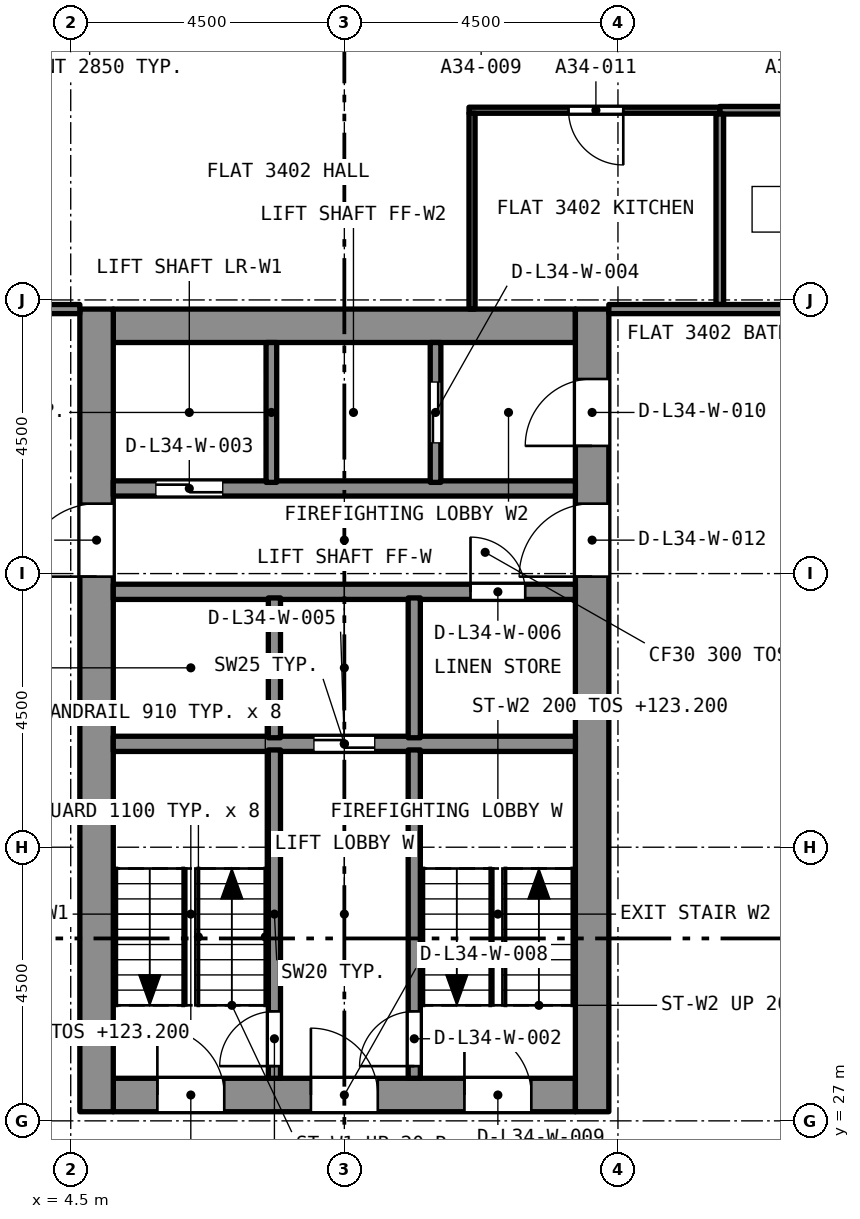
"""IFC4 building model, lengths in metres.
Left out: names, types, materials, properties, quantities, classifications, styles, units other than length and angle.
Written with IfcOpenShell. Run it as: python <this file> out.ifc"""

import sys

from ifc_helpers import new_model, si_unit, direction, frame, frame_2d, origin, place, context, subcontext, project, spatial, rectangle, extrude, element, fill, save


model = new_model("IFC4")
c1 = context("Model", 3, precision=1e-05, world=origin(), true_north=direction((0.0, 1.0)))
c2 = subcontext(c1, "Body", "Model", "MODEL_VIEW")
j1 = project(units=[si_unit("LENGTHUNIT", "METRE"), si_unit("PLANEANGLEUNIT", "RADIAN")], contexts=[c1])
p1 = place(None, origin())
s1 = spatial("IfcSite", under=j1, at=p1, CompositionType="ELEMENT")
p2 = place(p1, origin())
s2 = spatial("IfcBuilding", under=s1, at=p2, CompositionType="ELEMENT")
p3 = place(p2, frame((0.0, 0.0, 121.6)))
s3 = spatial("IfcBuildingStorey", under=s2, at=p3, CompositionType="ELEMENT", Elevation=121.6)
p4 = place(p3, frame((5.2, 27.425, 0.0), z_axis=(0.0, 0.0, 1.0), x_axis=(1.0, 0.0, 0.0)))
e1 = element("IfcWall", 1, at=p4, inside=s3, PredefinedType="SOLIDWALL", context=c2, shape_type="SweptSolid", body=[
    extrude(rectangle(XDim=7.6, YDim=0.55, at=frame_2d((3.8, 0.0))), origin(), (0.0, 0.0, 1.0), 3.2),
])
p5 = place(p4, frame((0.725, 0.0, 0.0)))
e2 = element("IfcOpeningElement", 2, at=p5, cuts=e1, PredefinedType="OPENING", context=c2, shape_type="SweptSolid", body=[
    extrude(rectangle(XDim=1.1, YDim=2.1, at=frame_2d((0.55, 1.05))), frame((0.0, 0.285, 0.0), z_axis=(0.0, -1.0, 0.0), x_axis=(1.0, 0.0, 0.0)), (0.0, 0.0, 1.0), 0.57),
])
p6 = place(p4, frame((3.25, 0.0, 0.0)))
e3 = element("IfcOpeningElement", 3, at=p6, cuts=e1, PredefinedType="OPENING", context=c2, shape_type="SweptSolid", body=[
    extrude(rectangle(XDim=1.1, YDim=2.1, at=frame_2d((0.55, 1.05))), frame((0.0, 0.285, 0.0), z_axis=(0.0, -1.0, 0.0), x_axis=(1.0, 0.0, 0.0)), (0.0, 0.0, 1.0), 0.57),
])
p7 = place(p4, frame((5.775, 0.0, 0.0)))
e4 = element("IfcOpeningElement", 4, at=p7, cuts=e1, PredefinedType="OPENING", context=c2, shape_type="SweptSolid", body=[
    extrude(rectangle(XDim=1.1, YDim=2.1, at=frame_2d((0.55, 1.05))), frame((0.0, 0.285, 0.0), z_axis=(0.0, -1.0, 0.0), x_axis=(1.0, 0.0, 0.0)), (0.0, 0.0, 1.0), 0.57),
])
p8 = place(p3, frame((5.2, 40.075, 0.0), z_axis=(0.0, 0.0, 1.0), x_axis=(1.0, 0.0, 0.0)))
e5 = element("IfcWall", 5, at=p8, inside=s3, PredefinedType="SOLIDWALL", context=c2, shape_type="SweptSolid", body=[
    extrude(rectangle(XDim=7.6, YDim=0.55, at=frame_2d((3.8, 0.0))), origin(), (0.0, 0.0, 1.0), 3.2),
])
p9 = place(p3, frame((4.925, 27.15, 0.0), z_axis=(0.0, 0.0, 1.0), x_axis=(0.0, 1.0, 0.0)))
e6 = element("IfcWall", 6, at=p9, inside=s3, PredefinedType="SOLIDWALL", context=c2, shape_type="SweptSolid", body=[
    extrude(rectangle(XDim=13.2, YDim=0.55, at=frame_2d((6.6, 0.0))), origin(), (0.0, 0.0, 1.0), 3.2),
])
p10 = place(p9, frame((8.8, 0.0, 0.0)))
e7 = element("IfcOpeningElement", 7, at=p10, cuts=e6, PredefinedType="OPENING", context=c2, shape_type="SweptSolid", body=[
    extrude(rectangle(XDim=1.2, YDim=2.1, at=frame_2d((0.6, 1.05))), frame((0.0, 0.285, 0.0), z_axis=(0.0, -1.0, 0.0), x_axis=(1.0, 0.0, 0.0)), (0.0, 0.0, 1.0), 0.57),
])
p11 = place(p3, frame((13.075, 27.15, 0.0), z_axis=(0.0, 0.0, 1.0), x_axis=(0.0, 1.0, 0.0)))
e8 = element("IfcWall", 8, at=p11, inside=s3, PredefinedType="SOLIDWALL", context=c2, shape_type="SweptSolid", body=[
    extrude(rectangle(XDim=13.2, YDim=0.55, at=frame_2d((6.6, 0.0))), origin(), (0.0, 0.0, 1.0), 3.2),
])
p12 = place(p11, frame((10.95, 0.0, 0.0)))
e9 = element("IfcOpeningElement", 9, at=p12, cuts=e8, PredefinedType="OPENING", context=c2, shape_type="SweptSolid", body=[
    extrude(rectangle(XDim=1.1, YDim=2.1, at=frame_2d((0.55, 1.05))), frame((0.0, 0.285, 0.0), z_axis=(0.0, -1.0, 0.0), x_axis=(1.0, 0.0, 0.0)), (0.0, 0.0, 1.0), 0.57),
])
p13 = place(p11, frame((8.8, 0.0, 0.0)))
e10 = element("IfcOpeningElement", 10, at=p13, cuts=e8, PredefinedType="OPENING", context=c2, shape_type="SweptSolid", body=[
    extrude(rectangle(XDim=1.2, YDim=2.1, at=frame_2d((0.6, 1.05))), frame((0.0, 0.285, 0.0), z_axis=(0.0, -1.0, 0.0), x_axis=(1.0, 0.0, 0.0)), (0.0, 0.0, 1.0), 0.57),
])
p14 = place(p3, frame((17.875, 43.62, 0.0), z_axis=(0.0, 0.0, 1.0), x_axis=(-1.0, 0.0, 0.0)))
e11 = element("IfcWall", 11, at=p14, inside=s3, PredefinedType="PARTITIONING", context=c2, shape_type="SweptSolid", body=[
    extrude(rectangle(XDim=2.7, YDim=0.125, at=frame_2d((1.35, 0.0))), origin(), (0.0, 0.0, 1.0), 2.85),
])
p15 = place(p14, frame((0.888, 0.0, 0.0)))
e12 = element("IfcOpeningElement", 12, at=p15, cuts=e11, PredefinedType="OPENING", context=c2, shape_type="SweptSolid", body=[
    extrude(rectangle(XDim=0.8, YDim=2.1, at=frame_2d((0.4, 1.05))), frame((0.0, 0.073, 0.0), z_axis=(0.0, -1.0, 0.0), x_axis=(1.0, 0.0, 0.0)), (0.0, 0.0, 1.0), 0.145),
])
p16 = place(p3, frame((15.175, 40.425, 0.0), z_axis=(0.0, 0.0, 1.0), x_axis=(0.0, 1.0, 0.0)))
e13 = element("IfcWall", 13, at=p16, inside=s3, PredefinedType="PARTITIONING", context=c2, shape_type="SweptSolid", body=[
    extrude(rectangle(XDim=3.133, YDim=0.125, at=frame_2d((1.566, 0.0))), origin(), (0.0, 0.0, 1.0), 2.85),
])
p17 = place(p3, frame((15.175, 43.62, 0.0), z_axis=(0.0, 0.0, 1.0), x_axis=(-1.0, 0.0, 0.0)))
e14 = element("IfcWall", 14, at=p17, inside=s3, PredefinedType="PARTITIONING", context=c2, shape_type="SweptSolid", body=[
    extrude(rectangle(XDim=4.125, YDim=0.1, at=frame_2d((2.062, 0.0))), origin(), (0.0, 0.0, 1.0), 2.85),
])
p18 = place(p17, frame((1.587, 0.0, 0.0)))
e15 = element("IfcOpeningElement", 15, at=p18, cuts=e14, PredefinedType="OPENING", context=c2, shape_type="SweptSolid", body=[
    extrude(rectangle(XDim=0.9, YDim=2.1, at=frame_2d((0.45, 1.05))), frame((0.0, 0.06, 0.0), z_axis=(0.0, -1.0, 0.0), x_axis=(1.0, 0.0, 0.0)), (0.0, 0.0, 1.0), 0.12),
])
p19 = place(p3, frame((11.1, 40.35, 0.0), z_axis=(0.0, 0.0, 1.0), x_axis=(0.0, 1.0, 0.0)))
e16 = element("IfcWall", 16, at=p19, inside=s3, PredefinedType="PARTITIONING", context=c2, shape_type="SweptSolid", body=[
    extrude(rectangle(XDim=3.22, YDim=0.1, at=frame_2d((1.61, 0.0))), origin(), (0.0, 0.0, 1.0), 2.85),
])
p20 = place(p3, frame((0.575, 40.35, 0.0), z_axis=(0.0, 0.0, 1.0), x_axis=(1.0, 0.0, 0.0)))
e17 = element("IfcWall", 17, at=p20, inside=s3, PredefinedType="PARTITIONING", context=c2, shape_type="SweptSolid", body=[
    extrude(rectangle(XDim=4.075, YDim=0.15, at=frame_2d((2.038, 0.0))), origin(), (0.0, 0.0, 1.0), 2.85),
])
p21 = place(p20, frame((1.175, 0.0, 0.0)))
e18 = element("IfcOpeningElement", 18, at=p21, cuts=e17, PredefinedType="OPENING", context=c2, shape_type="SweptSolid", body=[
    extrude(rectangle(XDim=1.0, YDim=2.1, at=frame_2d((0.5, 1.05))), frame((0.0, 0.085, 0.0), z_axis=(0.0, -1.0, 0.0), x_axis=(1.0, 0.0, 0.0)), (0.0, 0.0, 1.0), 0.17),
])
p22 = place(p3, frame((13.35, 40.35, 0.0), z_axis=(0.0, 0.0, 1.0), x_axis=(1.0, 0.0, 0.0)))
e19 = element("IfcWall", 19, at=p22, inside=s3, PredefinedType="PARTITIONING", context=c2, shape_type="SweptSolid", body=[
    extrude(rectangle(XDim=4.075, YDim=0.15, at=frame_2d((2.038, 0.0))), origin(), (0.0, 0.0, 1.0), 2.85),
])
p23 = place(p3, frame((5.2, 33.2, 0.0), z_axis=(0.0, 0.0, 1.0), x_axis=(1.0, 0.0, 0.0)))
e20 = element("IfcWall", 20, at=p23, inside=s3, PredefinedType="SOLIDWALL", context=c2, shape_type="SweptSolid", body=[
    extrude(rectangle(XDim=7.6, YDim=0.25, at=frame_2d((3.8, 0.0))), origin(), (0.0, 0.0, 1.0), 2.85),
])
p24 = place(p23, frame((3.3, 0.0, 0.0)))
e21 = element("IfcOpeningElement", 21, at=p24, cuts=e20, PredefinedType="OPENING", context=c2, shape_type="SweptSolid", body=[
    extrude(rectangle(XDim=1.0, YDim=2.1, at=frame_2d((0.5, 1.05))), frame((0.0, 0.135, 0.0), z_axis=(0.0, -1.0, 0.0), x_axis=(1.0, 0.0, 0.0)), (0.0, 0.0, 1.0), 0.27),
])
p25 = place(p3, frame((5.2, 35.7, 0.0), z_axis=(0.0, 0.0, 1.0), x_axis=(1.0, 0.0, 0.0)))
e22 = element("IfcWall", 22, at=p25, inside=s3, PredefinedType="SOLIDWALL", context=c2, shape_type="SweptSolid", body=[
    extrude(rectangle(XDim=7.6, YDim=0.25, at=frame_2d((3.8, 0.0))), origin(), (0.0, 0.0, 1.0), 2.85),
])
p26 = place(p25, frame((5.875, 0.0, 0.0)))
e23 = element("IfcOpeningElement", 23, at=p26, cuts=e22, PredefinedType="OPENING", context=c2, shape_type="SweptSolid", body=[
    extrude(rectangle(XDim=0.9, YDim=2.1, at=frame_2d((0.45, 1.05))), frame((0.0, 0.135, 0.0), z_axis=(0.0, -1.0, 0.0), x_axis=(1.0, 0.0, 0.0)), (0.0, 0.0, 1.0), 0.27),
])
p27 = place(p3, frame((5.2, 37.4, 0.0), z_axis=(0.0, 0.0, 1.0), x_axis=(1.0, 0.0, 0.0)))
e24 = element("IfcWall", 24, at=p27, inside=s3, PredefinedType="SOLIDWALL", context=c2, shape_type="SweptSolid", body=[
    extrude(rectangle(XDim=7.6, YDim=0.25, at=frame_2d((3.8, 0.0))), origin(), (0.0, 0.0, 1.0), 2.85),
])
p28 = place(p27, frame((0.7, 0.0, 0.0)))
e25 = element("IfcOpeningElement", 25, at=p28, cuts=e24, PredefinedType="OPENING", context=c2, shape_type="SweptSolid", body=[
    extrude(rectangle(XDim=1.1, YDim=2.4, at=frame_2d((0.55, 1.2))), frame((0.0, 0.135, 0.0), z_axis=(0.0, -1.0, 0.0), x_axis=(1.0, 0.0, 0.0)), (0.0, 0.0, 1.0), 0.27),
])
p29 = place(p3, frame((7.85, 27.7, 0.0), z_axis=(0.0, 0.0, 1.0), x_axis=(0.0, 1.0, 0.0)))
e26 = element("IfcWall", 26, at=p29, inside=s3, PredefinedType="SOLIDWALL", context=c2, shape_type="SweptSolid", body=[
    extrude(rectangle(XDim=5.4, YDim=0.2, at=frame_2d((2.7, 0.0))), origin(), (0.0, 0.0, 1.0), 2.85),
])
p30 = place(p29, frame((0.2, 0.0, 0.0)))
e27 = element("IfcOpeningElement", 27, at=p30, cuts=e26, PredefinedType="OPENING", context=c2, shape_type="SweptSolid", body=[
    extrude(rectangle(XDim=0.9, YDim=2.1, at=frame_2d((0.45, 1.05))), frame((0.0, 0.11, 0.0), z_axis=(0.0, -1.0, 0.0), x_axis=(1.0, 0.0, 0.0)), (0.0, 0.0, 1.0), 0.22),
])
p31 = place(p3, frame((10.15, 27.7, 0.0), z_axis=(0.0, 0.0, 1.0), x_axis=(0.0, 1.0, 0.0)))
e28 = element("IfcWall", 28, at=p31, inside=s3, PredefinedType="SOLIDWALL", context=c2, shape_type="SweptSolid", body=[
    extrude(rectangle(XDim=5.4, YDim=0.2, at=frame_2d((2.7, 0.0))), origin(), (0.0, 0.0, 1.0), 2.85),
])
p32 = place(p31, frame((0.2, 0.0, 0.0)))
e29 = element("IfcOpeningElement", 29, at=p32, cuts=e28, PredefinedType="OPENING", context=c2, shape_type="SweptSolid", body=[
    extrude(rectangle(XDim=0.9, YDim=2.1, at=frame_2d((0.45, 1.05))), frame((0.0, 0.11, 0.0), z_axis=(0.0, -1.0, 0.0), x_axis=(1.0, 0.0, 0.0)), (0.0, 0.0, 1.0), 0.22),
])
for number, where, z_axis, x_axis in (
    (30, (7.85, 33.3, 0.0), (0.0, 0.0, 1.0), (0.0, 1.0, 0.0)),
    (31, (10.15, 33.3, 0.0), (0.0, 0.0, 1.0), (0.0, 1.0, 0.0)),
):
    element("IfcWall", number, at=place(p3, frame(where, z_axis=z_axis, x_axis=x_axis)), inside=s3, PredefinedType="SOLIDWALL", context=c2, shape_type="SweptSolid", body=[
        extrude(rectangle(XDim=2.3, YDim=0.2, at=frame_2d((1.15, 0.0))), origin(), (0.0, 0.0, 1.0), 2.85),
    ])
p33 = place(p3, frame((7.8, 37.5, 0.0), z_axis=(0.0, 0.0, 1.0), x_axis=(0.0, 1.0, 0.0)))
e32 = element("IfcWall", 32, at=p33, inside=s3, PredefinedType="SOLIDWALL", context=c2, shape_type="SweptSolid", body=[
    extrude(rectangle(XDim=2.3, YDim=0.175, at=frame_2d((1.15, 0.0))), origin(), (0.0, 0.0, 1.0), 2.85),
])
p34 = place(p3, frame((10.5, 37.5, 0.0), z_axis=(0.0, 0.0, 1.0), x_axis=(0.0, 1.0, 0.0)))
e33 = element("IfcWall", 33, at=p34, inside=s3, PredefinedType="SOLIDWALL", context=c2, shape_type="SweptSolid", body=[
    extrude(rectangle(XDim=2.3, YDim=0.175, at=frame_2d((1.15, 0.0))), origin(), (0.0, 0.0, 1.0), 2.85),
])
p35 = place(p34, frame((0.65, 0.0, 0.0)))
e34 = element("IfcOpeningElement", 34, at=p35, cuts=e33, PredefinedType="OPENING", context=c2, shape_type="SweptSolid", body=[
    extrude(rectangle(XDim=1.0, YDim=2.1, at=frame_2d((0.5, 1.05))), frame((0.0, 0.097, 0.0), z_axis=(0.0, -1.0, 0.0), x_axis=(1.0, 0.0, 0.0)), (0.0, 0.0, 1.0), 0.195),
])
p36 = place(p18, origin())
e35 = element("IfcDoor", 35, at=p36, inside=s3, OperationType="SINGLE_SWING_LEFT", PredefinedType="DOOR", context=c2, shape_type="SweptSolid", body=[
    extrude(rectangle(XDim=0.9, YDim=2.1, at=frame_2d((0.45, 1.05))), frame((0.0, 0.025, 0.0), z_axis=(0.0, -1.0, 0.0), x_axis=(1.0, 0.0, 0.0)), (0.0, 0.0, 1.0), 0.05),
])
fill(e15, e35)
p37 = place(p30, origin())
e36 = element("IfcDoor", 36, at=p37, inside=s3, OperationType="SINGLE_SWING_LEFT", PredefinedType="DOOR", context=c2, shape_type="SweptSolid", body=[
    extrude(rectangle(XDim=0.9, YDim=2.1, at=frame_2d((0.45, 1.05))), frame((0.0, 0.025, 0.0), z_axis=(0.0, -1.0, 0.0), x_axis=(1.0, 0.0, 0.0)), (0.0, 0.0, 1.0), 0.05),
])
fill(e27, e36)
p38 = place(p32, origin())
e37 = element("IfcDoor", 37, at=p38, inside=s3, OperationType="SINGLE_SWING_LEFT", PredefinedType="DOOR", context=c2, shape_type="SweptSolid", body=[
    extrude(rectangle(XDim=0.9, YDim=2.1, at=frame_2d((0.45, 1.05))), frame((0.0, 0.025, 0.0), z_axis=(0.0, -1.0, 0.0), x_axis=(1.0, 0.0, 0.0)), (0.0, 0.0, 1.0), 0.05),
])
fill(e29, e37)
p39 = place(p28, origin())
e38 = element("IfcDoor", 38, at=p39, inside=s3, OperationType="SLIDING_TO_LEFT", PredefinedType="DOOR", context=c2, shape_type="SweptSolid", body=[
    extrude(rectangle(XDim=1.1, YDim=2.4, at=frame_2d((0.55, 1.2))), frame((0.0, 0.025, 0.0), z_axis=(0.0, -1.0, 0.0), x_axis=(1.0, 0.0, 0.0)), (0.0, 0.0, 1.0), 0.05),
])
fill(e25, e38)
p40 = place(p35, origin())
e39 = element("IfcDoor", 39, at=p40, inside=s3, OperationType="SLIDING_TO_LEFT", PredefinedType="DOOR", context=c2, shape_type="SweptSolid", body=[
    extrude(rectangle(XDim=1.0, YDim=2.1, at=frame_2d((0.5, 1.05))), frame((0.0, 0.025, 0.0), z_axis=(0.0, -1.0, 0.0), x_axis=(1.0, 0.0, 0.0)), (0.0, 0.0, 1.0), 0.05),
])
fill(e34, e39)
p41 = place(p24, origin())
e40 = element("IfcDoor", 40, at=p41, inside=s3, OperationType="SLIDING_TO_LEFT", PredefinedType="DOOR", context=c2, shape_type="SweptSolid", body=[
    extrude(rectangle(XDim=1.0, YDim=2.1, at=frame_2d((0.5, 1.05))), frame((0.0, 0.025, 0.0), z_axis=(0.0, -1.0, 0.0), x_axis=(1.0, 0.0, 0.0)), (0.0, 0.0, 1.0), 0.05),
])
fill(e21, e40)
p42 = place(p26, origin())
e41 = element("IfcDoor", 41, at=p42, inside=s3, OperationType="SINGLE_SWING_LEFT", PredefinedType="DOOR", context=c2, shape_type="SweptSolid", body=[
    extrude(rectangle(XDim=0.9, YDim=2.1, at=frame_2d((0.45, 1.05))), frame((0.0, 0.025, 0.0), z_axis=(0.0, -1.0, 0.0), x_axis=(1.0, 0.0, 0.0)), (0.0, 0.0, 1.0), 0.05),
])
fill(e23, e41)
p43 = place(p5, origin())
e42 = element("IfcDoor", 42, at=p43, inside=s3, OperationType="SINGLE_SWING_LEFT", PredefinedType="DOOR", context=c2, shape_type="SweptSolid", body=[
    extrude(rectangle(XDim=1.1, YDim=2.1, at=frame_2d((0.55, 1.05))), frame((0.0, 0.025, 0.0), z_axis=(0.0, -1.0, 0.0), x_axis=(1.0, 0.0, 0.0)), (0.0, 0.0, 1.0), 0.05),
])
fill(e2, e42)
p44 = place(p6, origin())
e43 = element("IfcDoor", 43, at=p44, inside=s3, OperationType="SINGLE_SWING_LEFT", PredefinedType="DOOR", context=c2, shape_type="SweptSolid", body=[
    extrude(rectangle(XDim=1.1, YDim=2.1, at=frame_2d((0.55, 1.05))), frame((0.0, 0.025, 0.0), z_axis=(0.0, -1.0, 0.0), x_axis=(1.0, 0.0, 0.0)), (0.0, 0.0, 1.0), 0.05),
])
fill(e3, e43)
p45 = place(p7, origin())
e44 = element("IfcDoor", 44, at=p45, inside=s3, OperationType="SINGLE_SWING_LEFT", PredefinedType="DOOR", context=c2, shape_type="SweptSolid", body=[
    extrude(rectangle(XDim=1.1, YDim=2.1, at=frame_2d((0.55, 1.05))), frame((0.0, 0.025, 0.0), z_axis=(0.0, -1.0, 0.0), x_axis=(1.0, 0.0, 0.0)), (0.0, 0.0, 1.0), 0.05),
])
fill(e4, e44)
p46 = place(p12, origin())
e45 = element("IfcDoor", 45, at=p46, inside=s3, OperationType="SINGLE_SWING_LEFT", PredefinedType="DOOR", context=c2, shape_type="SweptSolid", body=[
    extrude(rectangle(XDim=1.1, YDim=2.1, at=frame_2d((0.55, 1.05))), frame((0.0, 0.025, 0.0), z_axis=(0.0, -1.0, 0.0), x_axis=(1.0, 0.0, 0.0)), (0.0, 0.0, 1.0), 0.05),
])
fill(e9, e45)
p47 = place(p10, origin())
e46 = element("IfcDoor", 46, at=p47, inside=s3, OperationType="SINGLE_SWING_LEFT", PredefinedType="DOOR", context=c2, shape_type="SweptSolid", body=[
    extrude(rectangle(XDim=1.2, YDim=2.1, at=frame_2d((0.6, 1.05))), frame((0.0, 0.025, 0.0), z_axis=(0.0, -1.0, 0.0), x_axis=(1.0, 0.0, 0.0)), (0.0, 0.0, 1.0), 0.05),
])
fill(e7, e46)
p48 = place(p13, origin())
e47 = element("IfcDoor", 47, at=p48, inside=s3, OperationType="SINGLE_SWING_LEFT", PredefinedType="DOOR", context=c2, shape_type="SweptSolid", body=[
    extrude(rectangle(XDim=1.2, YDim=2.1, at=frame_2d((0.6, 1.05))), frame((0.0, 0.025, 0.0), z_axis=(0.0, -1.0, 0.0), x_axis=(1.0, 0.0, 0.0)), (0.0, 0.0, 1.0), 0.05),
])
fill(e10, e47)
save(model, sys.argv[1])
